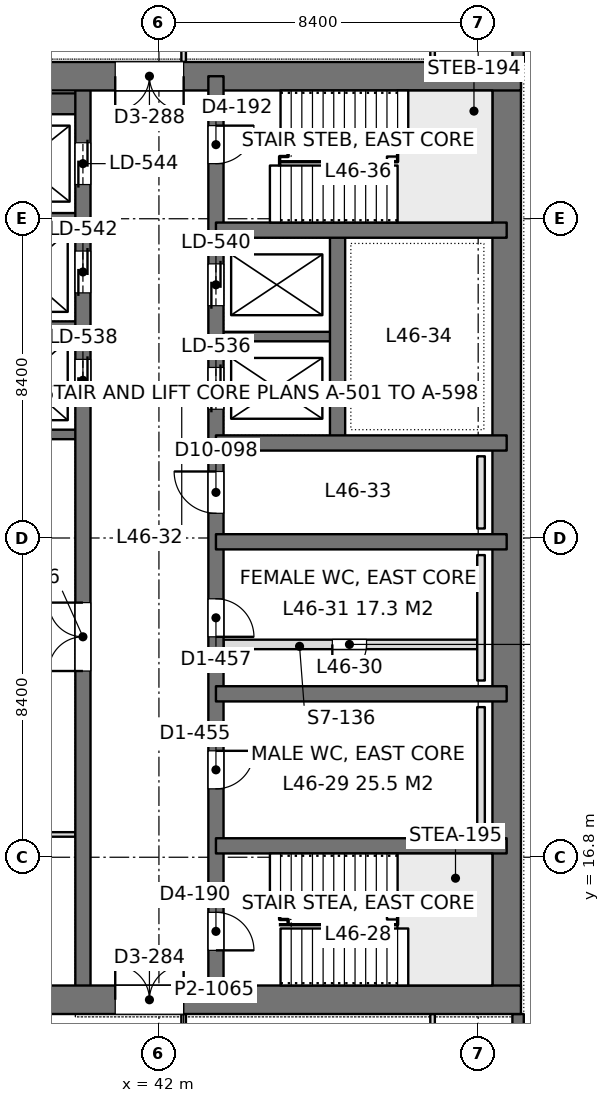
"""IFC4 building model, lengths in metres.
Left out: names, types, materials, properties, quantities, classifications, styles, units other than length and angle.
Written with IfcOpenShell. Run it as: python <this file> out.ifc"""

import sys

from ifc_helpers import new_model, si_unit, direction, frame, frame_2d, origin, place, context, subcontext, project, spatial, rectangle, extrude, element, fill, save


model = new_model("IFC4")
c1 = context("Model", 3, precision=1e-05, world=origin(), true_north=direction((0.0, 1.0)))
c2 = subcontext(c1, "Body", "Model", "MODEL_VIEW")
j1 = project(units=[si_unit("LENGTHUNIT", "METRE"), si_unit("PLANEANGLEUNIT", "RADIAN")], contexts=[c1])
p1 = place(None, origin())
s1 = spatial("IfcSite", under=j1, at=p1, CompositionType="ELEMENT")
p2 = place(p1, origin())
s2 = spatial("IfcBuilding", under=s1, at=p2, CompositionType="ELEMENT")
p3 = place(p2, frame((0.0, 0.0, 202.8)))
s3 = spatial("IfcBuildingStorey", under=s2, at=p3, CompositionType="ELEMENT", Elevation=202.8)
p4 = place(p3, frame((33.675, 13.05, 0.0), z_axis=(0.0, 0.0, 1.0), x_axis=(1.0, 0.0, 0.0)))
e1 = element("IfcWall", 1, at=p4, inside=s3, PredefinedType="SHEAR", context=c2, shape_type="SweptSolid", body=[
    extrude(rectangle(XDim=17.85, YDim=0.75, at=frame_2d((8.925, 0.0))), origin(), (0.0, 0.0, 1.0), 4.2),
])
p5 = place(p4, frame((7.175, 0.0, 0.0)))
e2 = element("IfcOpeningElement", 2, at=p5, cuts=e1, PredefinedType="OPENING", context=c2, shape_type="SweptSolid", body=[
    extrude(rectangle(XDim=1.8, YDim=2.4, at=frame_2d((0.9, 1.2))), frame((0.0, 0.385, 0.0), z_axis=(0.0, -1.0, 0.0), x_axis=(1.0, 0.0, 0.0)), (0.0, 0.0, 1.0), 0.77),
])
p6 = place(p3, frame((33.675, 37.35, 0.0), z_axis=(0.0, 0.0, 1.0), x_axis=(1.0, 0.0, 0.0)))
e3 = element("IfcWall", 3, at=p6, inside=s3, PredefinedType="SHEAR", context=c2, shape_type="SweptSolid", body=[
    extrude(rectangle(XDim=17.85, YDim=0.75, at=frame_2d((8.925, 0.0))), origin(), (0.0, 0.0, 1.0), 4.2),
])
p7 = place(p6, frame((7.175, 0.0, 0.0)))
e4 = element("IfcOpeningElement", 4, at=p7, cuts=e3, PredefinedType="OPENING", context=c2, shape_type="SweptSolid", body=[
    extrude(rectangle(XDim=1.8, YDim=2.4, at=frame_2d((0.9, 1.2))), frame((0.0, 0.385, 0.0), z_axis=(0.0, -1.0, 0.0), x_axis=(1.0, 0.0, 0.0)), (0.0, 0.0, 1.0), 0.77),
])
p8 = place(p3, frame((51.15, 13.05, 0.0), z_axis=(0.0, 0.0, 1.0), x_axis=(0.0, 1.0, 0.0)))
e5 = element("IfcWall", 5, at=p8, inside=s3, PredefinedType="SHEAR", context=c2, shape_type="SweptSolid", body=[
    extrude(rectangle(XDim=24.3, YDim=0.75, at=frame_2d((12.15, 0.0))), origin(), (0.0, 0.0, 1.0), 4.2),
])
p9 = place(p3, frame((43.5, 13.05, 0.0), z_axis=(0.0, 0.0, 1.0), x_axis=(0.0, 1.0, 0.0)))
e6 = element("IfcWall", 6, at=p9, inside=s3, PredefinedType="SHEAR", context=c2, shape_type="SweptSolid", body=[
    extrude(rectangle(XDim=24.3, YDim=0.4, at=frame_2d((12.15, 0.0))), origin(), (0.0, 0.0, 1.0), 4.2),
])
p10 = place(p9, frame((1.3, 0.0, 0.0)))
e7 = element("IfcOpeningElement", 7, at=p10, cuts=e6, PredefinedType="OPENING", context=c2, shape_type="SweptSolid", body=[
    extrude(rectangle(XDim=1.0, YDim=2.2, at=frame_2d((0.5, 1.1))), frame((0.0, 0.21, 0.0), z_axis=(0.0, -1.0, 0.0), x_axis=(1.0, 0.0, 0.0)), (0.0, 0.0, 1.0), 0.42),
])
p11 = place(p9, frame((22.0, 0.0, 0.0)))
e8 = element("IfcOpeningElement", 8, at=p11, cuts=e6, PredefinedType="OPENING", context=c2, shape_type="SweptSolid", body=[
    extrude(rectangle(XDim=1.0, YDim=2.2, at=frame_2d((0.5, 1.1))), frame((0.0, 0.21, 0.0), z_axis=(0.0, -1.0, 0.0), x_axis=(1.0, 0.0, 0.0)), (0.0, 0.0, 1.0), 0.42),
])
p12 = place(p9, frame((5.55, 0.0, 0.0)))
e9 = element("IfcOpeningElement", 9, at=p12, cuts=e6, PredefinedType="OPENING", context=c2, shape_type="SweptSolid", body=[
    extrude(rectangle(XDim=1.0, YDim=2.2, at=frame_2d((0.5, 1.1))), frame((0.0, 0.21, 0.0), z_axis=(0.0, -1.0, 0.0), x_axis=(1.0, 0.0, 0.0)), (0.0, 0.0, 1.0), 0.42),
])
p13 = place(p9, frame((9.55, 0.0, 0.0)))
e10 = element("IfcOpeningElement", 10, at=p13, cuts=e6, PredefinedType="OPENING", context=c2, shape_type="SweptSolid", body=[
    extrude(rectangle(XDim=1.0, YDim=2.2, at=frame_2d((0.5, 1.1))), frame((0.0, 0.21, 0.0), z_axis=(0.0, -1.0, 0.0), x_axis=(1.0, 0.0, 0.0)), (0.0, 0.0, 1.0), 0.42),
])
p14 = place(p9, frame((12.8, 0.0, 0.0)))
e11 = element("IfcOpeningElement", 11, at=p14, cuts=e6, PredefinedType="OPENING", context=c2, shape_type="SweptSolid", body=[
    extrude(rectangle(XDim=1.1, YDim=2.2, at=frame_2d((0.55, 1.1))), frame((0.0, 0.21, 0.0), z_axis=(0.0, -1.0, 0.0), x_axis=(1.0, 0.0, 0.0)), (0.0, 0.0, 1.0), 0.42),
])
p15 = place(p9, frame((15.538, 0.0, 0.0)))
e12 = element("IfcOpeningElement", 12, at=p15, cuts=e6, PredefinedType="OPENING", context=c2, shape_type="SweptSolid", body=[
    extrude(rectangle(XDim=1.1, YDim=2.2, at=frame_2d((0.55, 1.1))), frame((0.0, 0.21, 0.0), z_axis=(0.0, -1.0, 0.0), x_axis=(1.0, 0.0, 0.0)), (0.0, 0.0, 1.0), 0.42),
])
p16 = place(p9, frame((18.262, 0.0, 0.0)))
e13 = element("IfcOpeningElement", 13, at=p16, cuts=e6, PredefinedType="OPENING", context=c2, shape_type="SweptSolid", body=[
    extrude(rectangle(XDim=1.1, YDim=2.2, at=frame_2d((0.55, 1.1))), frame((0.0, 0.21, 0.0), z_axis=(0.0, -1.0, 0.0), x_axis=(1.0, 0.0, 0.0)), (0.0, 0.0, 1.0), 0.42),
])
p17 = place(p3, frame((40.0, 13.05, 0.0), z_axis=(0.0, 0.0, 1.0), x_axis=(0.0, 1.0, 0.0)))
e14 = element("IfcWall", 14, at=p17, inside=s3, PredefinedType="SHEAR", context=c2, shape_type="SweptSolid", body=[
    extrude(rectangle(XDim=24.3, YDim=0.4, at=frame_2d((12.15, 0.0))), origin(), (0.0, 0.0, 1.0), 4.2),
])
p18 = place(p17, frame((15.75, 0.0, 0.0)))
e15 = element("IfcOpeningElement", 15, at=p18, cuts=e14, PredefinedType="OPENING", context=c2, shape_type="SweptSolid", body=[
    extrude(rectangle(XDim=1.1, YDim=2.2, at=frame_2d((0.55, 1.1))), frame((0.0, 0.21, 0.0), z_axis=(0.0, -1.0, 0.0), x_axis=(1.0, 0.0, 0.0)), (0.0, 0.0, 1.0), 0.42),
])
p19 = place(p17, frame((18.6, 0.0, 0.0)))
e16 = element("IfcOpeningElement", 16, at=p19, cuts=e14, PredefinedType="OPENING", context=c2, shape_type="SweptSolid", body=[
    extrude(rectangle(XDim=1.1, YDim=2.2, at=frame_2d((0.55, 1.1))), frame((0.0, 0.21, 0.0), z_axis=(0.0, -1.0, 0.0), x_axis=(1.0, 0.0, 0.0)), (0.0, 0.0, 1.0), 0.42),
])
p20 = place(p17, frame((21.45, 0.0, 0.0)))
e17 = element("IfcOpeningElement", 17, at=p20, cuts=e14, PredefinedType="OPENING", context=c2, shape_type="SweptSolid", body=[
    extrude(rectangle(XDim=1.1, YDim=2.2, at=frame_2d((0.55, 1.1))), frame((0.0, 0.21, 0.0), z_axis=(0.0, -1.0, 0.0), x_axis=(1.0, 0.0, 0.0)), (0.0, 0.0, 1.0), 0.42),
])
p21 = place(p17, frame((8.65, 0.0, 0.0)))
e18 = element("IfcOpeningElement", 18, at=p21, cuts=e14, PredefinedType="OPENING", context=c2, shape_type="SweptSolid", body=[
    extrude(rectangle(XDim=1.8, YDim=2.4, at=frame_2d((0.9, 1.2))), frame((0.0, 0.21, 0.0), z_axis=(0.0, -1.0, 0.0), x_axis=(1.0, 0.0, 0.0)), (0.0, 0.0, 1.0), 0.42),
])
for number, where, z_axis, x_axis in (
    (19, (51.15, 17.1, 0.0), (0.0, 0.0, 1.0), (-1.0, 0.0, 0.0)),
    (20, (51.15, 21.1, 0.0), (0.0, 0.0, 1.0), (-1.0, 0.0, 0.0)),
    (21, (51.15, 25.1, 0.0), (0.0, 0.0, 1.0), (-1.0, 0.0, 0.0)),
    (22, (51.15, 27.7, 0.0), (0.0, 0.0, 1.0), (-1.0, 0.0, 0.0)),
    (23, (51.15, 33.3, 0.0), (0.0, 0.0, 1.0), (-1.0, 0.0, 0.0)),
):
    element("IfcWall", number, at=place(p3, frame(where, z_axis=z_axis, x_axis=x_axis)), inside=s3, PredefinedType="SHEAR", context=c2, shape_type="SweptSolid", body=[
        extrude(rectangle(XDim=7.65, YDim=0.4, at=frame_2d((3.825, 0.0))), origin(), (0.0, 0.0, 1.0), 4.2),
    ])
p22 = place(p3, frame((46.7, 27.7, 0.0), z_axis=(0.0, 0.0, 1.0), x_axis=(0.0, 1.0, 0.0)))
e24 = element("IfcWall", 24, at=p22, inside=s3, PredefinedType="SHEAR", context=c2, shape_type="SweptSolid", body=[
    extrude(rectangle(XDim=5.6, YDim=0.4, at=frame_2d((2.8, 0.0))), origin(), (0.0, 0.0, 1.0), 4.2),
])
p23 = place(p3, frame((46.7, 30.5, 0.0), z_axis=(0.0, 0.0, 1.0), x_axis=(-1.0, 0.0, 0.0)))
e25 = element("IfcWall", 25, at=p23, inside=s3, PredefinedType="SHEAR", context=c2, shape_type="SweptSolid", body=[
    extrude(rectangle(XDim=3.2, YDim=0.25, at=frame_2d((1.6, 0.0))), origin(), (0.0, 0.0, 1.0), 4.2),
])
p24 = place(p3, frame((40.0, 27.925, 0.0), z_axis=(0.0, 0.0, 1.0), x_axis=(-1.0, 0.0, 0.0)))
e26 = element("IfcWall", 26, at=p24, inside=s3, PredefinedType="SHEAR", context=c2, shape_type="SweptSolid", body=[
    extrude(rectangle(XDim=5.95, YDim=0.25, at=frame_2d((2.975, 0.0))), origin(), (0.0, 0.0, 1.0), 4.2),
])
for number, where, z_axis, x_axis in (
    (27, (40.0, 30.775, 0.0), (0.0, 0.0, 1.0), (-1.0, 0.0, 0.0)),
    (28, (40.0, 33.625, 0.0), (0.0, 0.0, 1.0), (-1.0, 0.0, 0.0)),
):
    element("IfcWall", number, at=place(p3, frame(where, z_axis=z_axis, x_axis=x_axis)), inside=s3, PredefinedType="SHEAR", context=c2, shape_type="SweptSolid", body=[
        extrude(rectangle(XDim=3.2, YDim=0.25, at=frame_2d((1.6, 0.0))), origin(), (0.0, 0.0, 1.0), 4.2),
    ])
p25 = place(p3, frame((40.0, 36.625, 0.0), z_axis=(0.0, 0.0, 1.0), x_axis=(-1.0, 0.0, 0.0)))
e29 = element("IfcWall", 29, at=p25, inside=s3, PredefinedType="SHEAR", context=c2, shape_type="SweptSolid", body=[
    extrude(rectangle(XDim=3.2, YDim=0.55, at=frame_2d((1.6, 0.0))), origin(), (0.0, 0.0, 1.0), 4.2),
])
p26 = place(p3, frame((51.45, 42.0, 0.0), z_axis=(0.0, 0.0, 1.0), x_axis=(0.0, -1.0, 0.0)))
e30 = element("IfcWall", 30, at=p26, inside=s3, PredefinedType="SOLIDWALL", context=c2, shape_type="SweptSolid", body=[
    extrude(rectangle(XDim=4.275, YDim=0.3, at=frame_2d((2.137, 0.0))), origin(), (0.0, 0.0, 1.0), 4.05),
])
p27 = place(p26, frame((0.938, 0.0, 0.9)))
e31 = element("IfcOpeningElement", 31, at=p27, cuts=e30, PredefinedType="OPENING", context=c2, shape_type="SweptSolid", body=[
    extrude(rectangle(XDim=2.4, YDim=1.9, at=frame_2d((1.2, 0.95))), frame((0.0, 0.16, 0.0), z_axis=(0.0, -1.0, 0.0), x_axis=(1.0, 0.0, 0.0)), (0.0, 0.0, 1.0), 0.32),
])
p28 = place(p3, frame((51.45, 12.675, 0.0), z_axis=(0.0, 0.0, 1.0), x_axis=(0.0, -1.0, 0.0)))
e32 = element("IfcWall", 32, at=p28, inside=s3, PredefinedType="SOLIDWALL", context=c2, shape_type="SweptSolid", body=[
    extrude(rectangle(XDim=4.275, YDim=0.3, at=frame_2d((2.138, 0.0))), origin(), (0.0, 0.0, 1.0), 4.05),
])
p29 = place(p28, frame((0.938, 0.0, 0.9)))
e33 = element("IfcOpeningElement", 33, at=p29, cuts=e32, PredefinedType="OPENING", context=c2, shape_type="SweptSolid", body=[
    extrude(rectangle(XDim=2.4, YDim=1.9, at=frame_2d((1.2, 0.95))), frame((0.0, 0.16, 0.0), z_axis=(0.0, -1.0, 0.0), x_axis=(1.0, 0.0, 0.0)), (0.0, 0.0, 1.0), 0.32),
])
p30 = place(p3, frame((33.898, 17.4, 0.0), z_axis=(0.0, 0.0, 1.0), x_axis=(1.0, 0.0, 0.0)))
e34 = element("IfcWall", 34, at=p30, inside=s3, PredefinedType="PARTITIONING", context=c2, shape_type="SweptSolid", body=[
    extrude(rectangle(XDim=5.904, YDim=0.12, at=frame_2d((2.952, 0.0))), origin(), (0.0, 0.0, 1.0), 3.55),
])
p31 = place(p3, frame((42.65, 11.158, 0.0), z_axis=(0.0, 0.0, 1.0), x_axis=(0.0, 1.0, 0.0)))
e35 = element("IfcWall", 35, at=p31, inside=s3, PredefinedType="PARTITIONING", context=c2, shape_type="SweptSolid", body=[
    extrude(rectangle(XDim=1.518, YDim=0.12, at=frame_2d((0.759, 0.0))), origin(), (0.0, 0.0, 1.0), 4.05),
])
p32 = place(p31, frame((0.192, 0.0, 0.0)))
e36 = element("IfcOpeningElement", 36, at=p32, cuts=e35, PredefinedType="OPENING", context=c2, shape_type="SweptSolid", body=[
    extrude(rectangle(XDim=1.0, YDim=2.4, at=frame_2d((0.5, 1.2))), frame((0.0, 0.07, 0.0), z_axis=(0.0, -1.0, 0.0), x_axis=(1.0, 0.0, 0.0)), (0.0, 0.0, 1.0), 0.14),
])
p33 = place(p3, frame((49.2, 11.1, 0.0), z_axis=(0.0, 0.0, 1.0), x_axis=(0.0, 1.0, 0.0)))
e37 = element("IfcWall", 37, at=p33, inside=s3, PredefinedType="PARTITIONING", context=c2, shape_type="SweptSolid", body=[
    extrude(rectangle(XDim=1.576, YDim=0.12, at=frame_2d((0.788, 0.0))), origin(), (0.0, 0.0, 1.0), 4.05),
])
p34 = place(p3, frame((42.65, 37.724, 0.0), z_axis=(0.0, 0.0, 1.0), x_axis=(0.0, 1.0, 0.0)))
e38 = element("IfcWall", 38, at=p34, inside=s3, PredefinedType="PARTITIONING", context=c2, shape_type="SweptSolid", body=[
    extrude(rectangle(XDim=1.518, YDim=0.12, at=frame_2d((0.759, 0.0))), origin(), (0.0, 0.0, 1.0), 4.05),
])
p35 = place(p34, frame((0.326, 0.0, 0.0)))
e39 = element("IfcOpeningElement", 39, at=p35, cuts=e38, PredefinedType="OPENING", context=c2, shape_type="SweptSolid", body=[
    extrude(rectangle(XDim=1.0, YDim=2.4, at=frame_2d((0.5, 1.2))), frame((0.0, 0.07, 0.0), z_axis=(0.0, -1.0, 0.0), x_axis=(1.0, 0.0, 0.0)), (0.0, 0.0, 1.0), 0.14),
])
p36 = place(p3, frame((49.2, 37.724, 0.0), z_axis=(0.0, 0.0, 1.0), x_axis=(0.0, 1.0, 0.0)))
e40 = element("IfcWall", 40, at=p36, inside=s3, PredefinedType="PARTITIONING", context=c2, shape_type="SweptSolid", body=[
    extrude(rectangle(XDim=1.576, YDim=0.12, at=frame_2d((0.788, 0.0))), origin(), (0.0, 0.0, 1.0), 4.05),
])
p37 = place(p3, frame((43.7, 22.4, 0.0), z_axis=(0.0, 0.0, 1.0), x_axis=(1.0, 0.0, 0.0)))
e41 = element("IfcWall", 41, at=p37, inside=s3, PredefinedType="PARTITIONING", context=c2, shape_type="SweptSolid", body=[
    extrude(rectangle(XDim=6.675, YDim=0.25, at=frame_2d((3.337, 0.0))), origin(), (0.0, 0.0, 1.0), 4.0),
])
p38 = place(p37, frame((2.863, 0.0, 0.0)))
e42 = element("IfcOpeningElement", 42, at=p38, cuts=e41, PredefinedType="OPENING", context=c2, shape_type="SweptSolid", body=[
    extrude(rectangle(XDim=0.9, YDim=2.2, at=frame_2d((0.45, 1.1))), frame((0.0, 0.135, 0.0), z_axis=(0.0, -1.0, 0.0), x_axis=(1.0, 0.0, 0.0)), (0.0, 0.0, 1.0), 0.27),
])
for number, where, z_axis, x_axis in (
    (43, (50.475, 17.45, 0.0), (0.0, 0.0, 1.0), (0.0, 1.0, 0.0)),
    (44, (50.475, 21.45, 0.0), (0.0, 0.0, 1.0), (0.0, 1.0, 0.0)),
):
    element("IfcWall", number, at=place(p3, frame(where, z_axis=z_axis, x_axis=x_axis)), inside=s3, PredefinedType="PLUMBINGWALL", context=c2, shape_type="SweptSolid", body=[
        extrude(rectangle(XDim=3.3, YDim=0.2, at=frame_2d((1.65, 0.0))), origin(), (0.0, 0.0, 1.0), 1.2),
    ])
p39 = place(p3, frame((50.475, 25.45, 0.0), z_axis=(0.0, 0.0, 1.0), x_axis=(0.0, 1.0, 0.0)))
e45 = element("IfcWall", 45, at=p39, inside=s3, PredefinedType="PLUMBINGWALL", context=c2, shape_type="SweptSolid", body=[
    extrude(rectangle(XDim=1.9, YDim=0.2, at=frame_2d((0.95, 0.0))), origin(), (0.0, 0.0, 1.0), 1.2),
])
p40 = place(p5, origin())
e46 = element("IfcDoor", 46, at=p40, inside=s3, OperationType="DOUBLE_DOOR_SINGLE_SWING", PredefinedType="DOOR", context=c2, shape_type="SweptSolid", body=[
    extrude(rectangle(XDim=1.8, YDim=2.4, at=frame_2d((0.9, 1.2))), frame((0.0, 0.025, 0.0), z_axis=(0.0, -1.0, 0.0), x_axis=(1.0, 0.0, 0.0)), (0.0, 0.0, 1.0), 0.05),
])
fill(e2, e46)
p41 = place(p7, frame((1.8, 0.0, 0.0), z_axis=(0.0, 0.0, 1.0), x_axis=(-1.0, 0.0, 0.0)))
e47 = element("IfcDoor", 47, at=p41, inside=s3, OperationType="DOUBLE_DOOR_SINGLE_SWING", PredefinedType="DOOR", context=c2, shape_type="SweptSolid", body=[
    extrude(rectangle(XDim=1.8, YDim=2.4, at=frame_2d((0.9, 1.2))), frame((0.0, 0.025, 0.0), z_axis=(0.0, -1.0, 0.0), x_axis=(1.0, 0.0, 0.0)), (0.0, 0.0, 1.0), 0.05),
])
fill(e4, e47)
p42 = place(p10, frame((1.0, 0.0, 0.0), z_axis=(0.0, 0.0, 1.0), x_axis=(-1.0, 0.0, 0.0)))
e48 = element("IfcDoor", 48, at=p42, inside=s3, OperationType="SINGLE_SWING_RIGHT", PredefinedType="DOOR", context=c2, shape_type="SweptSolid", body=[
    extrude(rectangle(XDim=1.0, YDim=2.2, at=frame_2d((0.5, 1.1))), frame((0.0, 0.025, 0.0), z_axis=(0.0, -1.0, 0.0), x_axis=(1.0, 0.0, 0.0)), (0.0, 0.0, 1.0), 0.05),
])
fill(e7, e48)
p43 = place(p11, frame((1.0, 0.0, 0.0), z_axis=(0.0, 0.0, 1.0), x_axis=(-1.0, 0.0, 0.0)))
e49 = element("IfcDoor", 49, at=p43, inside=s3, OperationType="SINGLE_SWING_LEFT", PredefinedType="DOOR", context=c2, shape_type="SweptSolid", body=[
    extrude(rectangle(XDim=1.0, YDim=2.2, at=frame_2d((0.5, 1.1))), frame((0.0, 0.025, 0.0), z_axis=(0.0, -1.0, 0.0), x_axis=(1.0, 0.0, 0.0)), (0.0, 0.0, 1.0), 0.05),
])
fill(e8, e49)
p44 = place(p12, frame((1.0, 0.0, 0.0), z_axis=(0.0, 0.0, 1.0), x_axis=(-1.0, 0.0, 0.0)))
e50 = element("IfcDoor", 50, at=p44, inside=s3, OperationType="SINGLE_SWING_LEFT", PredefinedType="DOOR", context=c2, shape_type="SweptSolid", body=[
    extrude(rectangle(XDim=1.0, YDim=2.2, at=frame_2d((0.5, 1.1))), frame((0.0, 0.025, 0.0), z_axis=(0.0, -1.0, 0.0), x_axis=(1.0, 0.0, 0.0)), (0.0, 0.0, 1.0), 0.05),
])
fill(e9, e50)
p45 = place(p13, frame((1.0, 0.0, 0.0), z_axis=(0.0, 0.0, 1.0), x_axis=(-1.0, 0.0, 0.0)))
e51 = element("IfcDoor", 51, at=p45, inside=s3, OperationType="SINGLE_SWING_RIGHT", PredefinedType="DOOR", context=c2, shape_type="SweptSolid", body=[
    extrude(rectangle(XDim=1.0, YDim=2.2, at=frame_2d((0.5, 1.1))), frame((0.0, 0.025, 0.0), z_axis=(0.0, -1.0, 0.0), x_axis=(1.0, 0.0, 0.0)), (0.0, 0.0, 1.0), 0.05),
])
fill(e10, e51)
p46 = place(p14, origin())
e52 = element("IfcDoor", 52, at=p46, inside=s3, OperationType="SINGLE_SWING_RIGHT", PredefinedType="DOOR", context=c2, shape_type="SweptSolid", body=[
    extrude(rectangle(XDim=1.1, YDim=2.2, at=frame_2d((0.55, 1.1))), frame((0.0, 0.025, 0.0), z_axis=(0.0, -1.0, 0.0), x_axis=(1.0, 0.0, 0.0)), (0.0, 0.0, 1.0), 0.05),
])
fill(e11, e52)
p47 = place(p18, origin())
e53 = element("IfcDoor", 53, at=p47, inside=s3, OperationType="DOUBLE_DOOR_SLIDING", PredefinedType="DOOR", context=c2, shape_type="SweptSolid", body=[
    extrude(rectangle(XDim=1.1, YDim=2.2, at=frame_2d((0.55, 1.1))), frame((0.0, 0.025, 0.0), z_axis=(0.0, -1.0, 0.0), x_axis=(1.0, 0.0, 0.0)), (0.0, 0.0, 1.0), 0.05),
])
fill(e15, e53)
p48 = place(p19, origin())
e54 = element("IfcDoor", 54, at=p48, inside=s3, OperationType="DOUBLE_DOOR_SLIDING", PredefinedType="DOOR", context=c2, shape_type="SweptSolid", body=[
    extrude(rectangle(XDim=1.1, YDim=2.2, at=frame_2d((0.55, 1.1))), frame((0.0, 0.025, 0.0), z_axis=(0.0, -1.0, 0.0), x_axis=(1.0, 0.0, 0.0)), (0.0, 0.0, 1.0), 0.05),
])
fill(e16, e54)
p49 = place(p20, origin())
e55 = element("IfcDoor", 55, at=p49, inside=s3, OperationType="DOUBLE_DOOR_SLIDING", PredefinedType="DOOR", context=c2, shape_type="SweptSolid", body=[
    extrude(rectangle(XDim=1.1, YDim=2.2, at=frame_2d((0.55, 1.1))), frame((0.0, 0.025, 0.0), z_axis=(0.0, -1.0, 0.0), x_axis=(1.0, 0.0, 0.0)), (0.0, 0.0, 1.0), 0.05),
])
fill(e17, e55)
p50 = place(p15, origin())
e56 = element("IfcDoor", 56, at=p50, inside=s3, OperationType="DOUBLE_DOOR_SLIDING", PredefinedType="DOOR", context=c2, shape_type="SweptSolid", body=[
    extrude(rectangle(XDim=1.1, YDim=2.2, at=frame_2d((0.55, 1.1))), frame((0.0, 0.025, 0.0), z_axis=(0.0, -1.0, 0.0), x_axis=(1.0, 0.0, 0.0)), (0.0, 0.0, 1.0), 0.05),
])
fill(e12, e56)
p51 = place(p16, origin())
e57 = element("IfcDoor", 57, at=p51, inside=s3, OperationType="DOUBLE_DOOR_SLIDING", PredefinedType="DOOR", context=c2, shape_type="SweptSolid", body=[
    extrude(rectangle(XDim=1.1, YDim=2.2, at=frame_2d((0.55, 1.1))), frame((0.0, 0.025, 0.0), z_axis=(0.0, -1.0, 0.0), x_axis=(1.0, 0.0, 0.0)), (0.0, 0.0, 1.0), 0.05),
])
fill(e13, e57)
p52 = place(p21, origin())
e58 = element("IfcDoor", 58, at=p52, inside=s3, OperationType="DOUBLE_DOOR_SINGLE_SWING", PredefinedType="DOOR", context=c2, shape_type="SweptSolid", body=[
    extrude(rectangle(XDim=1.8, YDim=2.4, at=frame_2d((0.9, 1.2))), frame((0.0, 0.025, 0.0), z_axis=(0.0, -1.0, 0.0), x_axis=(1.0, 0.0, 0.0)), (0.0, 0.0, 1.0), 0.05),
])
fill(e18, e58)
p53 = place(p38, frame((0.9, 0.0, 0.0), z_axis=(0.0, 0.0, 1.0), x_axis=(-1.0, 0.0, 0.0)))
e59 = element("IfcDoor", 59, at=p53, inside=s3, OperationType="SINGLE_SWING_RIGHT", PredefinedType="DOOR", context=c2, shape_type="SweptSolid", body=[
    extrude(rectangle(XDim=0.9, YDim=2.2, at=frame_2d((0.45, 1.1))), frame((0.0, 0.025, 0.0), z_axis=(0.0, -1.0, 0.0), x_axis=(1.0, 0.0, 0.0)), (0.0, 0.0, 1.0), 0.05),
])
fill(e42, e59)
save(model, sys.argv[1])
